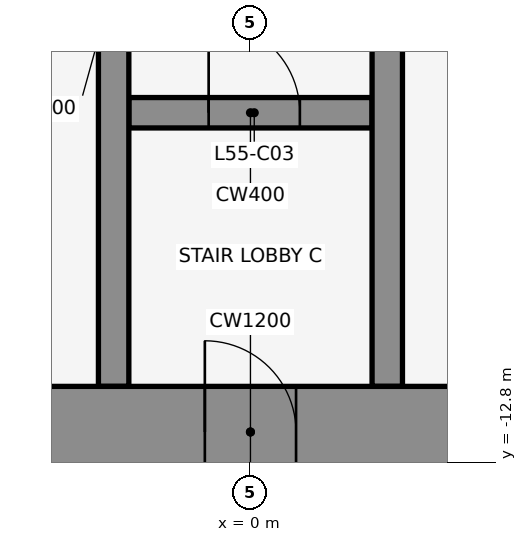
"""IFC4 building model, lengths in metres.
Left out: names, types, materials, properties, quantities, classifications, styles, units other than length and angle.
Written with IfcOpenShell. Run it as: python <this file> out.ifc"""

import sys

from ifc_helpers import new_model, si_unit, direction, frame, frame_2d, origin, place, context, subcontext, project, spatial, rectangle, extrude, element, fill, save


model = new_model("IFC4")
c1 = context("Model", 3, precision=1e-05, world=origin(), true_north=direction((0.0, 1.0)))
c2 = subcontext(c1, "Body", "Model", "MODEL_VIEW")
j1 = project(units=[si_unit("LENGTHUNIT", "METRE"), si_unit("PLANEANGLEUNIT", "RADIAN")], contexts=[c1])
p1 = place(None, origin())
s1 = spatial("IfcSite", under=j1, at=p1, CompositionType="ELEMENT")
p2 = place(p1, origin())
s2 = spatial("IfcBuilding", under=s1, at=p2, CompositionType="ELEMENT")
p3 = place(p2, frame((0.0, 0.0, 245.6)))
s3 = spatial("IfcBuildingStorey", under=s2, at=p3, CompositionType="ELEMENT", Elevation=245.6)
p4 = place(p3, frame((-1.6, -8.2, 0.0), z_axis=(0.0, 0.0, 1.0), x_axis=(1.0, 0.0, 0.0)))
e1 = element("IfcWall", 1, at=p4, inside=s3, PredefinedType="SHEAR", context=c2, shape_type="SweptSolid", body=[
    extrude(rectangle(XDim=3.2, YDim=0.4, at=frame_2d((1.6, 0.0))), origin(), (0.0, 0.0, 1.0), 4.2),
])
p5 = place(p4, frame((1.05, 0.0, 0.0)))
e2 = element("IfcOpeningElement", 2, at=p5, cuts=e1, PredefinedType="OPENING", context=c2, shape_type="SweptSolid", body=[
    extrude(rectangle(XDim=1.2, YDim=2.1, at=frame_2d((0.6, 1.05))), frame((0.0, 0.212, 0.0), z_axis=(0.0, -1.0, 0.0), x_axis=(1.0, 0.0, 0.0)), (0.0, 0.0, 1.0), 0.424),
])
for number, where, z_axis, x_axis in (
    (3, (-1.8, -11.8, 0.0), (0.0, 0.0, 1.0), (0.0, 1.0, 0.0)),
    (4, (1.8, -11.8, 0.0), (0.0, 0.0, 1.0), (0.0, 1.0, 0.0)),
):
    element("IfcWall", number, at=place(p3, frame(where, z_axis=z_axis, x_axis=x_axis)), inside=s3, PredefinedType="SHEAR", context=c2, shape_type="SweptSolid", body=[
        extrude(rectangle(XDim=10.6, YDim=0.4, at=frame_2d((5.3, 0.0))), origin(), (0.0, 0.0, 1.0), 4.2),
    ])
p6 = place(p3, frame((-22.0, -12.4, 0.0), z_axis=(0.0, 0.0, 1.0), x_axis=(1.0, 0.0, 0.0)))
e5 = element("IfcWall", 5, at=p6, inside=s3, PredefinedType="SHEAR", context=c2, shape_type="SweptSolid", body=[
    extrude(rectangle(XDim=44.0, YDim=1.2, at=frame_2d((22.0, 0.0))), origin(), (0.0, 0.0, 1.0), 4.2),
])
p7 = place(p6, frame((2.2, 0.0, 0.0)))
e6 = element("IfcOpeningElement", 6, at=p7, cuts=e5, PredefinedType="OPENING", context=c2, shape_type="SweptSolid", body=[
    extrude(rectangle(XDim=1.2, YDim=2.1, at=frame_2d((0.6, 1.05))), frame((0.0, 0.612, 0.0), z_axis=(0.0, -1.0, 0.0), x_axis=(1.0, 0.0, 0.0)), (0.0, 0.0, 1.0), 1.224),
])
p8 = place(p6, frame((21.4, 0.0, 0.0)))
e7 = element("IfcOpeningElement", 7, at=p8, cuts=e5, PredefinedType="OPENING", context=c2, shape_type="SweptSolid", body=[
    extrude(rectangle(XDim=1.2, YDim=2.1, at=frame_2d((0.6, 1.05))), frame((0.0, 0.612, 0.0), z_axis=(0.0, -1.0, 0.0), x_axis=(1.0, 0.0, 0.0)), (0.0, 0.0, 1.0), 1.224),
])
p9 = place(p6, frame((40.6, 0.0, 0.0)))
e8 = element("IfcOpeningElement", 8, at=p9, cuts=e5, PredefinedType="OPENING", context=c2, shape_type="SweptSolid", body=[
    extrude(rectangle(XDim=1.2, YDim=2.1, at=frame_2d((0.6, 1.05))), frame((0.0, 0.612, 0.0), z_axis=(0.0, -1.0, 0.0), x_axis=(1.0, 0.0, 0.0)), (0.0, 0.0, 1.0), 1.224),
])
p10 = place(p6, frame((16.0, 0.0, 0.0)))
e9 = element("IfcOpeningElement", 9, at=p10, cuts=e5, PredefinedType="OPENING", context=c2, shape_type="SweptSolid", body=[
    extrude(rectangle(XDim=1.8, YDim=2.1, at=frame_2d((0.9, 1.05))), frame((0.0, 0.612, 0.0), z_axis=(0.0, -1.0, 0.0), x_axis=(1.0, 0.0, 0.0)), (0.0, 0.0, 1.0), 1.224),
])
p11 = place(p6, frame((6.3, 0.0, 0.0)))
e10 = element("IfcOpeningElement", 10, at=p11, cuts=e5, PredefinedType="OPENING", context=c2, shape_type="SweptSolid", body=[
    extrude(rectangle(XDim=1.2, YDim=2.1, at=frame_2d((0.6, 1.05))), frame((0.0, 0.612, 0.0), z_axis=(0.0, -1.0, 0.0), x_axis=(1.0, 0.0, 0.0)), (0.0, 0.0, 1.0), 1.224),
])
p12 = place(p6, frame((26.2, 0.0, 0.0)))
e11 = element("IfcOpeningElement", 11, at=p12, cuts=e5, PredefinedType="OPENING", context=c2, shape_type="SweptSolid", body=[
    extrude(rectangle(XDim=1.8, YDim=2.1, at=frame_2d((0.9, 1.05))), frame((0.0, 0.612, 0.0), z_axis=(0.0, -1.0, 0.0), x_axis=(1.0, 0.0, 0.0)), (0.0, 0.0, 1.0), 1.224),
])
p13 = place(p6, frame((36.5, 0.0, 0.0)))
e12 = element("IfcOpeningElement", 12, at=p13, cuts=e5, PredefinedType="OPENING", context=c2, shape_type="SweptSolid", body=[
    extrude(rectangle(XDim=1.2, YDim=2.1, at=frame_2d((0.6, 1.05))), frame((0.0, 0.612, 0.0), z_axis=(0.0, -1.0, 0.0), x_axis=(1.0, 0.0, 0.0)), (0.0, 0.0, 1.0), 1.224),
])
p14 = place(p5, origin())
e13 = element("IfcDoor", 13, at=p14, inside=s3, OperationType="SINGLE_SWING_LEFT", PredefinedType="DOOR", context=c2, shape_type="SweptSolid", body=[
    extrude(rectangle(XDim=1.2, YDim=2.1, at=frame_2d((0.6, 1.05))), frame((0.0, 0.025, 0.0), z_axis=(0.0, -1.0, 0.0), x_axis=(1.0, 0.0, 0.0)), (0.0, 0.0, 1.0), 0.05),
])
fill(e2, e13)
p15 = place(p8, frame((1.2, 0.0, 0.0), z_axis=(0.0, 0.0, 1.0), x_axis=(-1.0, 0.0, 0.0)))
e14 = element("IfcDoor", 14, at=p15, inside=s3, OperationType="SINGLE_SWING_RIGHT", PredefinedType="DOOR", context=c2, shape_type="SweptSolid", body=[
    extrude(rectangle(XDim=1.2, YDim=2.1, at=frame_2d((0.6, 1.05))), frame((0.0, 0.025, 0.0), z_axis=(0.0, -1.0, 0.0), x_axis=(1.0, 0.0, 0.0)), (0.0, 0.0, 1.0), 0.05),
])
fill(e7, e14)
save(model, sys.argv[1])
